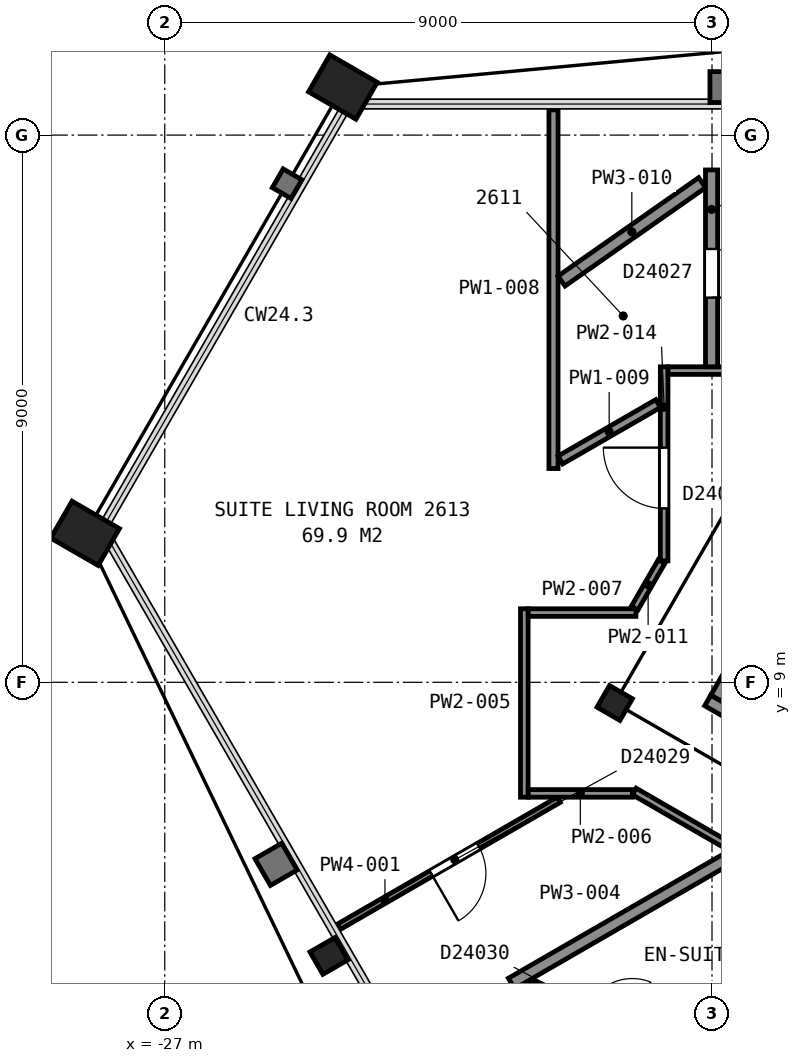
"""IFC4 building model, lengths in metres.
Left out: names, types, materials, properties, quantities, classifications, styles, units other than length and angle.
Written with IfcOpenShell. Run it as: python <this file> out.ifc"""

import sys

from ifc_helpers import new_model, si_unit, direction, frame, frame_2d, origin, origin_2d, place, context, subcontext, project, spatial, rectangle, hollow_rectangle, i_section, extrude, element, fill, save


model = new_model("IFC4")
c1 = context("Model", 3, precision=1e-05, world=origin(), true_north=direction((0.0, 1.0)))
c2 = subcontext(c1, "Body", "Model", "MODEL_VIEW")
j1 = project(units=[si_unit("LENGTHUNIT", "METRE"), si_unit("PLANEANGLEUNIT", "RADIAN")], contexts=[c1])
p1 = place(None, origin())
s1 = spatial("IfcSite", under=j1, at=p1, CompositionType="ELEMENT")
p2 = place(p1, origin())
s2 = spatial("IfcBuilding", under=s1, at=p2, CompositionType="ELEMENT")
p3 = place(p2, frame((0.0, 0.0, 110.8)))
s3 = spatial("IfcBuildingStorey", under=s2, at=p3, CompositionType="ELEMENT", Elevation=110.8)
for number, where, z_axis, x_axis in (
    (1, (-24.07, 18.79, 0.0), (0.0, 0.0, 1.0), (0.5, 0.866, 0.0)),
    (2, (-28.31, 11.45, 0.0), (0.0, 0.0, 1.0), (0.5, 0.866, 0.0)),
):
    element("IfcColumn", number, at=place(p3, frame(where, z_axis=z_axis, x_axis=x_axis)), inside=s3, PredefinedType="COLUMN", context=c2, shape_type="SweptSolid", body=[
        extrude(hollow_rectangle(XDim=0.7, YDim=0.9, WallThickness=0.065, at=origin_2d()), origin(), (0.0, 0.0, 1.0), 3.6),
    ])
p4 = place(p3, frame((-24.3, 4.5, 0.0), z_axis=(0.0, 0.0, 1.0), x_axis=(-0.5, 0.866025403784, 0.0)))
e3 = element("IfcColumn", 3, at=p4, inside=s3, PredefinedType="COLUMN", context=c2, shape_type="SweptSolid", body=[
    extrude(i_section(OverallWidth=0.424, OverallDepth=0.475, WebThickness=0.048, FlangeThickness=0.077, FilletRadius=0.015, at=origin_2d()), origin(), (0.0, 0.0, 1.0), 3.6),
])
p5 = place(p3, frame((-19.6, 8.66, 0.0), z_axis=(0.0, 0.0, 1.0), x_axis=(0.5, 0.866025403784, 0.0)))
e4 = element("IfcColumn", 4, at=p5, inside=s3, PredefinedType="COLUMN", context=c2, shape_type="SweptSolid", body=[
    extrude(i_section(OverallWidth=0.411, OverallDepth=0.434, WebThickness=0.036, FlangeThickness=0.057, FilletRadius=0.015, at=origin_2d()), origin(), (0.0, 0.0, 1.0), 3.6),
])
p6 = place(p3, frame((-16.534, 11.162, 0.0), z_axis=(0.0, 0.0, 1.0), x_axis=(-0.49998411664, -0.866034573852, 0.0)))
e5 = element("IfcWall", 5, at=p6, inside=s3, PredefinedType="PARTITIONING", context=c2, shape_type="SweptSolid", body=[
    extrude(rectangle(XDim=2.8, YDim=0.2, at=frame_2d((1.4, 0.0))), origin(), (0.0, 0.0, 1.0), 3.35),
])
p7 = place(p6, frame((0.85, 0.0, 0.0)))
e6 = element("IfcOpeningElement", 6, at=p7, cuts=e5, PredefinedType="OPENING", context=c2, shape_type="SweptSolid", body=[
    extrude(rectangle(XDim=1.1, YDim=2.1, at=frame_2d((0.55, 1.05))), frame((0.0, 0.11, 0.0), z_axis=(0.0, -1.0, 0.0), x_axis=(1.0, 0.0, 0.0)), (0.0, 0.0, 1.0), 0.22),
])
p8 = place(p3, frame((-7.678, 2.701, 0.0), z_axis=(0.0, 0.0, 1.0), x_axis=(-0.866026010844, 0.49999894854, 0.0)))
e7 = element("IfcWall", 7, at=p8, inside=s3, PredefinedType="PARTITIONING", context=c2, shape_type="SweptSolid", body=[
    extrude(rectangle(XDim=12.0, YDim=0.2, at=frame_2d((6.0, 0.0))), origin(), (0.0, 0.0, 1.0), 3.35),
])
p9 = place(p3, frame((-20.521, 7.067, 0.0), z_axis=(0.0, 0.0, 1.0), x_axis=(-0.866025950195, -0.499999053588, 0.0)))
e8 = element("IfcWall", 8, at=p9, inside=s3, PredefinedType="PARTITIONING", context=c2, shape_type="SweptSolid", body=[
    extrude(rectangle(XDim=4.177, YDim=0.1, at=frame_2d((2.088, 0.0))), origin(), (0.0, 0.0, 1.0), 2.613),
])
p10 = place(p9, frame((1.522, 0.0, 0.0)))
e9 = element("IfcOpeningElement", 9, at=p10, cuts=e8, PredefinedType="OPENING", context=c2, shape_type="SweptSolid", body=[
    extrude(rectangle(XDim=0.9, YDim=2.1, at=frame_2d((0.45, 1.05))), frame((0.0, 0.06, 0.0), z_axis=(0.0, -1.0, 0.0), x_axis=(1.0, 0.0, 0.0)), (0.0, 0.0, 1.0), 0.12),
])
p11 = place(p3, frame((-21.725, 0.798, 0.0), z_axis=(0.0, 0.0, 1.0), x_axis=(0.866003534372, 0.50003787702, 0.0)))
e10 = element("IfcWall", 10, at=p11, inside=s3, PredefinedType="PARTITIONING", context=c2, shape_type="SweptSolid", body=[
    extrude(rectangle(XDim=7.348, YDim=0.15, at=frame_2d((3.674, 0.0))), origin(), (0.0, 0.0, 1.0), 2.613),
])
p12 = place(p3, frame((-21.021, 4.02, 0.0), z_axis=(0.0, 0.0, 1.0), x_axis=(0.927010502524, -0.375035369278, 0.0)))
e11 = element("IfcWall", 11, at=p12, inside=s3, PredefinedType="PARTITIONING", context=c2, shape_type="SweptSolid", body=[
    extrude(rectangle(XDim=2.92, YDim=0.2, at=frame_2d((1.46, 0.0))), origin(), (0.0, 0.0, 1.0), 2.613),
])
p13 = place(p12, frame((1.045, 0.0, 0.0)))
e12 = element("IfcOpeningElement", 12, at=p13, cuts=e11, PredefinedType="OPENING", context=c2, shape_type="SweptSolid", body=[
    extrude(rectangle(XDim=0.8, YDim=2.1, at=frame_2d((0.4, 1.05))), frame((0.0, 0.11, 0.0), z_axis=(0.0, -1.0, 0.0), x_axis=(1.0, 0.0, 0.0)), (0.0, 0.0, 1.0), 0.22),
])
p14 = place(p3, frame((-21.298, 4.047, 0.0), z_axis=(0.0, 0.0, 1.0), x_axis=(0.865948008923, 0.500134027879, 0.0)))
e13 = element("IfcWall", 13, at=p14, inside=s3, PredefinedType="PARTITIONING", context=c2, shape_type="SweptSolid", body=[
    extrude(rectangle(XDim=4.193, YDim=0.2, at=frame_2d((2.097, 0.0))), origin(), (0.0, 0.0, 1.0), 2.613),
])
p15 = place(p3, frame((-21.087, 7.111, 0.0), z_axis=(0.0, 0.0, 1.0), x_axis=(0.0, 1.0, 0.0)))
e14 = element("IfcWall", 14, at=p15, inside=s3, PredefinedType="PARTITIONING", context=c2, shape_type="SweptSolid", body=[
    extrude(rectangle(XDim=3.099, YDim=0.125, at=frame_2d((1.549, 0.0))), origin(), (0.0, 0.0, 1.0), 2.613),
])
p16 = place(p3, frame((-21.022, 7.173, 0.0), z_axis=(0.0, 0.0, 1.0), x_axis=(1.0, 0.0, 0.0)))
e15 = element("IfcWall", 15, at=p16, inside=s3, PredefinedType="PARTITIONING", context=c2, shape_type="SweptSolid", body=[
    extrude(rectangle(XDim=1.713, YDim=0.125, at=frame_2d((0.856, 0.0))), origin(), (0.0, 0.0, 1.0), 2.613),
])
p17 = place(p3, frame((-21.022, 10.147, 0.0), z_axis=(0.0, 0.0, 1.0), x_axis=(1.0, 0.0, 0.0)))
e16 = element("IfcWall", 16, at=p17, inside=s3, PredefinedType="PARTITIONING", context=c2, shape_type="SweptSolid", body=[
    extrude(rectangle(XDim=1.771, YDim=0.125, at=frame_2d((0.885, 0.0))), origin(), (0.0, 0.0, 1.0), 2.613),
])
p18 = place(p3, frame((-20.607, 12.516, 0.0), z_axis=(0.0, 0.0, 1.0), x_axis=(0.0, 1.0, 0.0)))
e17 = element("IfcWall", 17, at=p18, inside=s3, PredefinedType="PARTITIONING", context=c2, shape_type="SweptSolid", body=[
    extrude(rectangle(XDim=5.899, YDim=0.15, at=frame_2d((2.949, 0.0))), origin(), (0.0, 0.0, 1.0), 2.613),
])
p19 = place(p3, frame((-20.494, 12.656, 0.0), z_axis=(0.0, 0.0, 1.0), x_axis=(0.865984062371, 0.500071598593, 0.0)))
e18 = element("IfcWall", 18, at=p19, inside=s3, PredefinedType="PARTITIONING", context=c2, shape_type="SweptSolid", body=[
    extrude(rectangle(XDim=1.856, YDim=0.15, at=frame_2d((0.928, 0.0))), origin(), (0.0, 0.0, 1.0), 2.613),
])
p20 = place(p3, frame((-20.475, 15.6, 0.0), z_axis=(0.0, 0.0, 1.0), x_axis=(0.819231920519, 0.573462344363, 0.0)))
e19 = element("IfcWall", 19, at=p20, inside=s3, PredefinedType="PARTITIONING", context=c2, shape_type="SweptSolid", body=[
    extrude(rectangle(XDim=2.822, YDim=0.2, at=frame_2d((1.411, 0.0))), origin(), (0.0, 0.0, 1.0), 2.613),
])
p21 = place(p3, frame((-19.271, 10.221, 0.0), z_axis=(0.0, 0.0, 1.0), x_axis=(0.499881837328, 0.866093614288, 0.0)))
e20 = element("IfcWall", 20, at=p21, inside=s3, PredefinedType="PARTITIONING", context=c2, shape_type="SweptSolid", body=[
    extrude(rectangle(XDim=0.884, YDim=0.125, at=frame_2d((0.442, 0.0))), origin(), (0.0, 0.0, 1.0), 2.613),
])
p22 = place(p3, frame((-19.278, 7.204, 0.0), z_axis=(0.0, 0.0, 1.0), x_axis=(0.865992261418, -0.50005739987, 0.0)))
e21 = element("IfcWall", 21, at=p22, inside=s3, PredefinedType="PARTITIONING", context=c2, shape_type="SweptSolid", body=[
    extrude(rectangle(XDim=4.101, YDim=0.125, at=frame_2d((2.051, 0.0))), origin(), (0.0, 0.0, 1.0), 2.613),
])
p23 = place(p3, frame((-18.787, 10.998, 0.0), z_axis=(0.0, 0.0, 1.0), x_axis=(0.0, 1.0, 0.0)))
e22 = element("IfcWall", 22, at=p23, inside=s3, PredefinedType="PARTITIONING", context=c2, shape_type="SweptSolid", body=[
    extrude(rectangle(XDim=3.192, YDim=0.125, at=frame_2d((1.596, 0.0))), origin(), (0.0, 0.0, 1.0), 2.613),
])
p24 = place(p23, frame((0.863, 0.0, 0.0)))
e23 = element("IfcOpeningElement", 23, at=p24, cuts=e22, PredefinedType="OPENING", context=c2, shape_type="SweptSolid", body=[
    extrude(rectangle(XDim=1.0, YDim=2.1, at=frame_2d((0.5, 1.05))), frame((0.0, 0.073, 0.0), z_axis=(0.0, -1.0, 0.0), x_axis=(1.0, 0.0, 0.0)), (0.0, 0.0, 1.0), 0.145),
])
p25 = place(p3, frame((-18.722, 14.127, 0.0), z_axis=(0.0, 0.0, 1.0), x_axis=(1.0, 0.0, 0.0)))
e24 = element("IfcWall", 24, at=p25, inside=s3, PredefinedType="PARTITIONING", context=c2, shape_type="SweptSolid", body=[
    extrude(rectangle(XDim=2.971, YDim=0.125, at=frame_2d((1.486, 0.0))), origin(), (0.0, 0.0, 1.0), 2.613),
])
p26 = place(p3, frame((-18.007, 14.189, 0.0), z_axis=(0.0, 0.0, 1.0), x_axis=(0.0, 1.0, 0.0)))
e25 = element("IfcWall", 25, at=p26, inside=s3, PredefinedType="PARTITIONING", context=c2, shape_type="SweptSolid", body=[
    extrude(rectangle(XDim=3.238, YDim=0.2, at=frame_2d((1.619, 0.0))), origin(), (0.0, 0.0, 1.0), 2.613),
])
p27 = place(p26, frame((1.137, 0.0, 0.0)))
e26 = element("IfcOpeningElement", 26, at=p27, cuts=e25, PredefinedType="OPENING", context=c2, shape_type="SweptSolid", body=[
    extrude(rectangle(XDim=0.8, YDim=2.1, at=frame_2d((0.4, 1.05))), frame((0.0, 0.11, 0.0), z_axis=(0.0, -1.0, 0.0), x_axis=(1.0, 0.0, 0.0)), (0.0, 0.0, 1.0), 0.22),
])
p28 = place(p10, origin())
e27 = element("IfcDoor", 27, at=p28, inside=s3, OperationType="SINGLE_SWING_RIGHT", PredefinedType="DOOR", context=c2, shape_type="SweptSolid", body=[
    extrude(rectangle(XDim=0.9, YDim=2.1, at=frame_2d((0.45, 1.05))), frame((0.0, 0.025, 0.0), z_axis=(0.0, -1.0, 0.0), x_axis=(1.0, 0.0, 0.0)), (0.0, 0.0, 1.0), 0.05),
])
fill(e9, e27)
p29 = place(p24, origin())
e28 = element("IfcDoor", 28, at=p29, inside=s3, OperationType="SINGLE_SWING_RIGHT", PredefinedType="DOOR", context=c2, shape_type="SweptSolid", body=[
    extrude(rectangle(XDim=1.0, YDim=2.1, at=frame_2d((0.5, 1.05))), frame((0.0, 0.025, 0.0), z_axis=(0.0, -1.0, 0.0), x_axis=(1.0, 0.0, 0.0)), (0.0, 0.0, 1.0), 0.05),
])
fill(e23, e28)
p30 = place(p27, origin())
e29 = element("IfcDoor", 29, at=p30, inside=s3, OperationType="SINGLE_SWING_LEFT", PredefinedType="DOOR", context=c2, shape_type="SweptSolid", body=[
    extrude(rectangle(XDim=0.8, YDim=2.1, at=frame_2d((0.4, 1.05))), frame((0.0, 0.025, 0.0), z_axis=(0.0, -1.0, 0.0), x_axis=(1.0, 0.0, 0.0)), (0.0, 0.0, 1.0), 0.05),
])
fill(e26, e29)
save(model, sys.argv[1])
